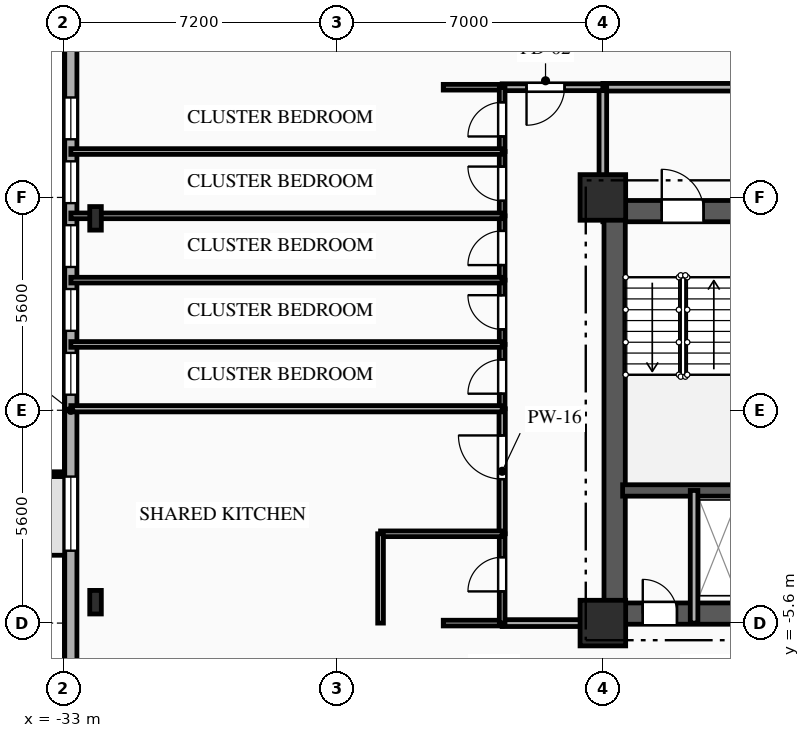
"""IFC4 building model, lengths in metres.
Left out: names, types, materials, properties, quantities, classifications, styles, units other than length and angle.
Written with IfcOpenShell. Run it as: python <this file> out.ifc"""

import sys

from ifc_helpers import new_model, si_unit, direction, frame, frame_2d, origin, origin_2d, place, context, subcontext, project, spatial, rectangle, i_section, extrude, element, fill, save


model = new_model("IFC4")
c1 = context("Model", 3, precision=1e-05, world=origin(), true_north=direction((0.0, 1.0)))
c2 = subcontext(c1, "Body", "Model", "MODEL_VIEW")
j1 = project(units=[si_unit("LENGTHUNIT", "METRE"), si_unit("PLANEANGLEUNIT", "RADIAN")], contexts=[c1])
p1 = place(None, origin())
s1 = spatial("IfcSite", under=j1, at=p1, CompositionType="ELEMENT")
p2 = place(p1, origin())
s2 = spatial("IfcBuilding", under=s1, at=p2, CompositionType="ELEMENT")
p3 = place(p2, frame((0.0, 0.0, 40.4)))
s3 = spatial("IfcBuildingStorey", under=s2, at=p3, CompositionType="ELEMENT", Elevation=40.4)
for number, where, z_axis, x_axis in (
    (1, (-18.8, -5.6, 0.0), (0.0, 0.0, 1.0), (1.0, 0.0, 0.0)),
    (2, (-18.8, 5.6, 0.0), (0.0, 0.0, 1.0), (1.0, 0.0, 0.0)),
):
    element("IfcColumn", number, at=place(p3, frame(where, z_axis=z_axis, x_axis=x_axis)), inside=s3, PredefinedType="COLUMN", context=c2, shape_type="SweptSolid", body=[
        extrude(rectangle(XDim=1.2, YDim=1.2, at=origin_2d()), origin(), (0.0, 0.0, 1.0), 3.35),
    ])
for number, where, z_axis, x_axis in (
    (3, (-32.15, 5.05, 0.0), (0.0, 0.0, 1.0), (1.0, 0.0, 0.0)),
    (4, (-32.15, -5.05, 0.0), (0.0, 0.0, 1.0), (1.0, 0.0, 0.0)),
):
    element("IfcColumn", number, at=place(p3, frame(where, z_axis=z_axis, x_axis=x_axis)), inside=s3, PredefinedType="COLUMN", context=c2, shape_type="SweptSolid", body=[
        extrude(i_section(OverallWidth=0.305, OverallDepth=0.62, WebThickness=0.021, FlangeThickness=0.04, FilletRadius=0.027, at=origin_2d()), origin(), (0.0, 0.0, 1.0), 3.35),
    ])
p4 = place(p3, frame((-32.8, -15.8, 0.0), z_axis=(0.0, 0.0, 1.0), x_axis=(0.0, 1.0, 0.0)))
e5 = element("IfcWall", 5, at=p4, inside=s3, PredefinedType="SOLIDWALL", context=c2, shape_type="SweptSolid", body=[
    extrude(rectangle(XDim=31.6, YDim=0.32, at=frame_2d((15.8, 0.0))), origin(), (0.0, 0.0, 1.0), 3.035),
])
p5 = place(p4, frame((12.105, 0.0, 0.85)))
e6 = element("IfcOpeningElement", 6, at=p5, cuts=e5, PredefinedType="OPENING", context=c2, shape_type="SweptSolid", body=[
    extrude(rectangle(XDim=1.95, YDim=1.85, at=frame_2d((0.975, 0.925))), frame((0.0, 0.17, 0.0), z_axis=(0.0, -1.0, 0.0), x_axis=(1.0, 0.0, 0.0)), (0.0, 0.0, 1.0), 0.34),
])
p6 = place(p4, frame((16.21, 0.0, 0.85)))
e7 = element("IfcOpeningElement", 7, at=p6, cuts=e5, PredefinedType="OPENING", context=c2, shape_type="SweptSolid", body=[
    extrude(rectangle(XDim=1.1, YDim=1.85, at=frame_2d((0.55, 0.925))), frame((0.0, 0.17, 0.0), z_axis=(0.0, -1.0, 0.0), x_axis=(1.0, 0.0, 0.0)), (0.0, 0.0, 1.0), 0.34),
])
p7 = place(p4, frame((17.89, 0.0, 0.85)))
e8 = element("IfcOpeningElement", 8, at=p7, cuts=e5, PredefinedType="OPENING", context=c2, shape_type="SweptSolid", body=[
    extrude(rectangle(XDim=1.1, YDim=1.85, at=frame_2d((0.55, 0.925))), frame((0.0, 0.17, 0.0), z_axis=(0.0, -1.0, 0.0), x_axis=(1.0, 0.0, 0.0)), (0.0, 0.0, 1.0), 0.34),
])
p8 = place(p4, frame((19.57, 0.0, 0.85)))
e9 = element("IfcOpeningElement", 9, at=p8, cuts=e5, PredefinedType="OPENING", context=c2, shape_type="SweptSolid", body=[
    extrude(rectangle(XDim=1.1, YDim=1.85, at=frame_2d((0.55, 0.925))), frame((0.0, 0.17, 0.0), z_axis=(0.0, -1.0, 0.0), x_axis=(1.0, 0.0, 0.0)), (0.0, 0.0, 1.0), 0.34),
])
p9 = place(p4, frame((21.25, 0.0, 0.85)))
e10 = element("IfcOpeningElement", 10, at=p9, cuts=e5, PredefinedType="OPENING", context=c2, shape_type="SweptSolid", body=[
    extrude(rectangle(XDim=1.1, YDim=1.85, at=frame_2d((0.55, 0.925))), frame((0.0, 0.17, 0.0), z_axis=(0.0, -1.0, 0.0), x_axis=(1.0, 0.0, 0.0)), (0.0, 0.0, 1.0), 0.34),
])
p10 = place(p4, frame((22.93, 0.0, 0.85)))
e11 = element("IfcOpeningElement", 11, at=p10, cuts=e5, PredefinedType="OPENING", context=c2, shape_type="SweptSolid", body=[
    extrude(rectangle(XDim=1.1, YDim=1.85, at=frame_2d((0.55, 0.925))), frame((0.0, 0.17, 0.0), z_axis=(0.0, -1.0, 0.0), x_axis=(1.0, 0.0, 0.0)), (0.0, 0.0, 1.0), 0.34),
])
p11 = place(p3, frame((-18.8, 5.24, 0.0), z_axis=(0.0, 0.0, 1.0), x_axis=(1.0, 0.0, 0.0)))
e12 = element("IfcWall", 12, at=p11, inside=s3, PredefinedType="SHEAR", context=c2, shape_type="SweptSolid", body=[
    extrude(rectangle(XDim=9.6, YDim=0.56, at=frame_2d((4.8, 0.0))), origin(), (0.0, 0.0, 1.0), 3.035),
])
p12 = place(p11, frame((1.55, 0.0, 0.0)))
e13 = element("IfcOpeningElement", 13, at=p12, cuts=e12, PredefinedType="OPENING", context=c2, shape_type="SweptSolid", body=[
    extrude(rectangle(XDim=1.1, YDim=2.15, at=frame_2d((0.55, 1.075))), frame((0.0, 0.29, 0.0), z_axis=(0.0, -1.0, 0.0), x_axis=(1.0, 0.0, 0.0)), (0.0, 0.0, 1.0), 0.58),
])
p13 = place(p11, frame((4.775, 0.0, 0.0)))
e14 = element("IfcOpeningElement", 14, at=p13, cuts=e12, PredefinedType="OPENING", context=c2, shape_type="SweptSolid", body=[
    extrude(rectangle(XDim=1.05, YDim=2.1, at=frame_2d((0.525, 1.05))), frame((0.0, 0.29, 0.0), z_axis=(0.0, -1.0, 0.0), x_axis=(1.0, 0.0, 0.0)), (0.0, 0.0, 1.0), 0.58),
])
p14 = place(p3, frame((-18.8, -5.35, 0.0), z_axis=(0.0, 0.0, 1.0), x_axis=(1.0, 0.0, 0.0)))
e15 = element("IfcWall", 15, at=p14, inside=s3, PredefinedType="SHEAR", context=c2, shape_type="SweptSolid", body=[
    extrude(rectangle(XDim=9.6, YDim=0.56, at=frame_2d((4.8, 0.0))), origin(), (0.0, 0.0, 1.0), 3.035),
])
p15 = place(p14, frame((1.05, 0.0, 0.0)))
e16 = element("IfcOpeningElement", 16, at=p15, cuts=e15, PredefinedType="OPENING", context=c2, shape_type="SweptSolid", body=[
    extrude(rectangle(XDim=0.9, YDim=2.1, at=frame_2d((0.45, 1.05))), frame((0.0, 0.29, 0.0), z_axis=(0.0, -1.0, 0.0), x_axis=(1.0, 0.0, 0.0)), (0.0, 0.0, 1.0), 0.58),
])
p16 = place(p3, frame((-18.49, -5.05, 0.0), z_axis=(0.0, 0.0, 1.0), x_axis=(0.0, 1.0, 0.0)))
e17 = element("IfcWall", 17, at=p16, inside=s3, PredefinedType="SHEAR", context=c2, shape_type="SweptSolid", body=[
    extrude(rectangle(XDim=10.1, YDim=0.56, at=frame_2d((5.05, 0.0))), origin(), (0.0, 0.0, 1.0), 3.035),
])
p17 = place(p3, frame((-18.28, -2.11, 0.0), z_axis=(0.0, 0.0, 1.0), x_axis=(1.0, 0.0, 0.0)))
e18 = element("IfcWall", 18, at=p17, inside=s3, PredefinedType="SHEAR", context=c2, shape_type="SweptSolid", body=[
    extrude(rectangle(XDim=3.18, YDim=0.3, at=frame_2d((1.59, 0.0))), origin(), (0.0, 0.0, 1.0), 3.035),
])
p18 = place(p3, frame((-16.4, -5.6, 0.0), z_axis=(0.0, 0.0, 1.0), x_axis=(0.0, 1.0, 0.0)))
e19 = element("IfcWall", 19, at=p18, inside=s3, PredefinedType="PARTITIONING", context=c2, shape_type="SweptSolid", body=[
    extrude(rectangle(XDim=3.49, YDim=0.2, at=frame_2d((1.745, 0.0))), origin(), (0.0, 0.0, 1.0), 3.035),
])
p19 = place(p3, frame((-12.0, 8.5, 0.0), z_axis=(0.0, 0.0, 1.0), x_axis=(-1.0, 0.0, 0.0)))
e20 = element("IfcWall", 20, at=p19, inside=s3, PredefinedType="PARTITIONING", context=c2, shape_type="SweptSolid", body=[
    extrude(rectangle(XDim=6.8, YDim=0.2, at=frame_2d((3.4, 0.0))), origin(), (0.0, 0.0, 1.0), 3.035),
])
p20 = place(p19, frame((1.715, 0.0, 0.0)))
e21 = element("IfcOpeningElement", 21, at=p20, cuts=e20, PredefinedType="OPENING", context=c2, shape_type="SweptSolid", body=[
    extrude(rectangle(XDim=1.1, YDim=2.15, at=frame_2d((0.55, 1.075))), frame((0.0, 0.11, 0.0), z_axis=(0.0, -1.0, 0.0), x_axis=(1.0, 0.0, 0.0)), (0.0, 0.0, 1.0), 0.22),
])
p21 = place(p3, frame((-18.8, 8.5, 0.0), z_axis=(0.0, 0.0, 1.0), x_axis=(0.0, -1.0, 0.0)))
e22 = element("IfcWall", 22, at=p21, inside=s3, PredefinedType="PARTITIONING", context=c2, shape_type="SweptSolid", body=[
    extrude(rectangle(XDim=2.9, YDim=0.2, at=frame_2d((1.45, 0.0))), origin(), (0.0, 0.0, 1.0), 2.52),
])
p22 = place(p3, frame((-18.8, 8.5, 0.0), z_axis=(0.0, 0.0, 1.0), x_axis=(-1.0, 0.0, 0.0)))
e23 = element("IfcWall", 23, at=p22, inside=s3, PredefinedType="PARTITIONING", context=c2, shape_type="SweptSolid", body=[
    extrude(rectangle(XDim=2.65, YDim=0.18, at=frame_2d((1.325, 0.0))), origin(), (0.0, 0.0, 1.0), 3.035),
])
p23 = place(p22, frame((1.009, 0.0, 0.0)))
e24 = element("IfcOpeningElement", 24, at=p23, cuts=e23, PredefinedType="OPENING", context=c2, shape_type="SweptSolid", body=[
    extrude(rectangle(XDim=1.0, YDim=2.15, at=frame_2d((0.5, 1.075))), frame((0.0, 0.1, 0.0), z_axis=(0.0, -1.0, 0.0), x_axis=(1.0, 0.0, 0.0)), (0.0, 0.0, 1.0), 0.2),
])
p24 = place(p3, frame((-21.45, 8.5, 0.0), z_axis=(0.0, 0.0, 1.0), x_axis=(-1.0, 0.0, 0.0)))
e25 = element("IfcWall", 25, at=p24, inside=s3, PredefinedType="PARTITIONING", context=c2, shape_type="SweptSolid", body=[
    extrude(rectangle(XDim=1.55, YDim=0.15, at=frame_2d((0.775, 0.0))), origin(), (0.0, 0.0, 1.0), 3.035),
])
p25 = place(p3, frame((-21.45, -5.6, 0.0), z_axis=(0.0, 0.0, 1.0), x_axis=(1.0, 0.0, 0.0)))
e26 = element("IfcWall", 26, at=p25, inside=s3, PredefinedType="PARTITIONING", context=c2, shape_type="SweptSolid", body=[
    extrude(rectangle(XDim=2.65, YDim=0.18, at=frame_2d((1.325, 0.0))), origin(), (0.0, 0.0, 1.0), 3.035),
])
p26 = place(p3, frame((-23.0, -5.6, 0.0), z_axis=(0.0, 0.0, 1.0), x_axis=(1.0, 0.0, 0.0)))
e27 = element("IfcWall", 27, at=p26, inside=s3, PredefinedType="PLUMBINGWALL", context=c2, shape_type="SweptSolid", body=[
    extrude(rectangle(XDim=1.55, YDim=0.15, at=frame_2d((0.775, 0.0))), origin(), (0.0, 0.0, 1.0), 3.035),
])
p27 = place(p3, frame((-21.45, -5.6, 0.0), z_axis=(0.0, 0.0, 1.0), x_axis=(0.0, 1.0, 0.0)))
e28 = element("IfcWall", 28, at=p27, inside=s3, PredefinedType="PLUMBINGWALL", context=c2, shape_type="SweptSolid", body=[
    extrude(rectangle(XDim=2.35, YDim=0.15, at=frame_2d((1.175, 0.0))), origin(), (0.0, 0.0, 1.0), 3.035),
])
p28 = place(p27, frame((0.834, 0.0, 0.0)))
e29 = element("IfcOpeningElement", 29, at=p28, cuts=e28, PredefinedType="OPENING", context=c2, shape_type="SweptSolid", body=[
    extrude(rectangle(XDim=0.9, YDim=2.1, at=frame_2d((0.45, 1.05))), frame((0.0, 0.085, 0.0), z_axis=(0.0, -1.0, 0.0), x_axis=(1.0, 0.0, 0.0)), (0.0, 0.0, 1.0), 0.17),
])
p29 = place(p3, frame((-21.45, -3.25, 0.0), z_axis=(0.0, 0.0, 1.0), x_axis=(0.0, 1.0, 0.0)))
e30 = element("IfcWall", 30, at=p29, inside=s3, PredefinedType="PARTITIONING", context=c2, shape_type="SweptSolid", body=[
    extrude(rectangle(XDim=3.29, YDim=0.165, at=frame_2d((1.645, 0.0))), origin(), (0.0, 0.0, 1.0), 3.035),
])
p30 = place(p29, frame((1.438, 0.0, 0.0)))
e31 = element("IfcOpeningElement", 31, at=p30, cuts=e30, PredefinedType="OPENING", context=c2, shape_type="SweptSolid", body=[
    extrude(rectangle(XDim=1.15, YDim=2.15, at=frame_2d((0.575, 1.075))), frame((0.0, 0.093, 0.0), z_axis=(0.0, -1.0, 0.0), x_axis=(1.0, 0.0, 0.0)), (0.0, 0.0, 1.0), 0.185),
])
p31 = place(p3, frame((-21.45, 0.04, 0.0), z_axis=(0.0, 0.0, 1.0), x_axis=(0.0, 1.0, 0.0)))
e32 = element("IfcWall", 32, at=p31, inside=s3, PredefinedType="PARTITIONING", context=c2, shape_type="SweptSolid", body=[
    extrude(rectangle(XDim=1.692, YDim=0.15, at=frame_2d((0.846, 0.0))), origin(), (0.0, 0.0, 1.0), 3.035),
])
p32 = place(p31, frame((0.396, 0.0, 0.0)))
e33 = element("IfcOpeningElement", 33, at=p32, cuts=e32, PredefinedType="OPENING", context=c2, shape_type="SweptSolid", body=[
    extrude(rectangle(XDim=0.9, YDim=2.1, at=frame_2d((0.45, 1.05))), frame((0.0, 0.085, 0.0), z_axis=(0.0, -1.0, 0.0), x_axis=(1.0, 0.0, 0.0)), (0.0, 0.0, 1.0), 0.17),
])
p33 = place(p3, frame((-21.45, 1.732, 0.0), z_axis=(0.0, 0.0, 1.0), x_axis=(0.0, 1.0, 0.0)))
e34 = element("IfcWall", 34, at=p33, inside=s3, PredefinedType="PARTITIONING", context=c2, shape_type="SweptSolid", body=[
    extrude(rectangle(XDim=1.692, YDim=0.15, at=frame_2d((0.846, 0.0))), origin(), (0.0, 0.0, 1.0), 3.035),
])
p34 = place(p33, frame((0.396, 0.0, 0.0)))
e35 = element("IfcOpeningElement", 35, at=p34, cuts=e34, PredefinedType="OPENING", context=c2, shape_type="SweptSolid", body=[
    extrude(rectangle(XDim=0.9, YDim=2.1, at=frame_2d((0.45, 1.05))), frame((0.0, 0.085, 0.0), z_axis=(0.0, -1.0, 0.0), x_axis=(1.0, 0.0, 0.0)), (0.0, 0.0, 1.0), 0.17),
])
p35 = place(p3, frame((-21.45, 3.424, 0.0), z_axis=(0.0, 0.0, 1.0), x_axis=(0.0, 1.0, 0.0)))
e36 = element("IfcWall", 36, at=p35, inside=s3, PredefinedType="PARTITIONING", context=c2, shape_type="SweptSolid", body=[
    extrude(rectangle(XDim=1.692, YDim=0.15, at=frame_2d((0.846, 0.0))), origin(), (0.0, 0.0, 1.0), 3.035),
])
p36 = place(p35, frame((0.396, 0.0, 0.0)))
e37 = element("IfcOpeningElement", 37, at=p36, cuts=e36, PredefinedType="OPENING", context=c2, shape_type="SweptSolid", body=[
    extrude(rectangle(XDim=0.9, YDim=2.1, at=frame_2d((0.45, 1.05))), frame((0.0, 0.085, 0.0), z_axis=(0.0, -1.0, 0.0), x_axis=(1.0, 0.0, 0.0)), (0.0, 0.0, 1.0), 0.17),
])
p37 = place(p3, frame((-21.45, 5.116, 0.0), z_axis=(0.0, 0.0, 1.0), x_axis=(0.0, 1.0, 0.0)))
e38 = element("IfcWall", 38, at=p37, inside=s3, PredefinedType="PARTITIONING", context=c2, shape_type="SweptSolid", body=[
    extrude(rectangle(XDim=1.692, YDim=0.15, at=frame_2d((0.846, 0.0))), origin(), (0.0, 0.0, 1.0), 3.035),
])
p38 = place(p37, frame((0.396, 0.0, 0.0)))
e39 = element("IfcOpeningElement", 39, at=p38, cuts=e38, PredefinedType="OPENING", context=c2, shape_type="SweptSolid", body=[
    extrude(rectangle(XDim=0.9, YDim=2.1, at=frame_2d((0.45, 1.05))), frame((0.0, 0.085, 0.0), z_axis=(0.0, -1.0, 0.0), x_axis=(1.0, 0.0, 0.0)), (0.0, 0.0, 1.0), 0.17),
])
p39 = place(p3, frame((-21.45, 6.808, 0.0), z_axis=(0.0, 0.0, 1.0), x_axis=(0.0, 1.0, 0.0)))
e40 = element("IfcWall", 40, at=p39, inside=s3, PredefinedType="PARTITIONING", context=c2, shape_type="SweptSolid", body=[
    extrude(rectangle(XDim=1.692, YDim=0.15, at=frame_2d((0.846, 0.0))), origin(), (0.0, 0.0, 1.0), 3.035),
])
p40 = place(p39, frame((0.396, 0.0, 0.0)))
e41 = element("IfcOpeningElement", 41, at=p40, cuts=e40, PredefinedType="OPENING", context=c2, shape_type="SweptSolid", body=[
    extrude(rectangle(XDim=0.9, YDim=2.1, at=frame_2d((0.45, 1.05))), frame((0.0, 0.085, 0.0), z_axis=(0.0, -1.0, 0.0), x_axis=(1.0, 0.0, 0.0)), (0.0, 0.0, 1.0), 0.17),
])
p41 = place(p3, frame((-24.65, -3.25, 0.0), z_axis=(0.0, 0.0, 1.0), x_axis=(1.0, 0.0, 0.0)))
e42 = element("IfcWall", 42, at=p41, inside=s3, PredefinedType="PLUMBINGWALL", context=c2, shape_type="SweptSolid", body=[
    extrude(rectangle(XDim=3.2, YDim=0.15, at=frame_2d((1.6, 0.0))), origin(), (0.0, 0.0, 1.0), 2.52),
])
p42 = place(p3, frame((-24.65, -5.6, 0.0), z_axis=(0.0, 0.0, 1.0), x_axis=(0.0, 1.0, 0.0)))
e43 = element("IfcWall", 43, at=p42, inside=s3, PredefinedType="PLUMBINGWALL", context=c2, shape_type="SweptSolid", body=[
    extrude(rectangle(XDim=2.35, YDim=0.15, at=frame_2d((1.175, 0.0))), origin(), (0.0, 0.0, 1.0), 3.035),
])
p43 = place(p3, frame((-32.8, 0.04, 0.0), z_axis=(0.0, 0.0, 1.0), x_axis=(1.0, 0.0, 0.0)))
e44 = element("IfcWall", 44, at=p43, inside=s3, PredefinedType="PARTITIONING", context=c2, shape_type="SweptSolid", body=[
    extrude(rectangle(XDim=11.35, YDim=0.165, at=frame_2d((5.675, 0.0))), origin(), (0.0, 0.0, 1.0), 3.035),
])
p44 = place(p3, frame((-32.8, 1.732, 0.0), z_axis=(0.0, 0.0, 1.0), x_axis=(1.0, 0.0, 0.0)))
e45 = element("IfcWall", 45, at=p44, inside=s3, PredefinedType="PARTITIONING", context=c2, shape_type="SweptSolid", body=[
    extrude(rectangle(XDim=11.35, YDim=0.15, at=frame_2d((5.675, 0.0))), origin(), (0.0, 0.0, 1.0), 3.035),
])
for number, where, z_axis, x_axis in (
    (46, (-32.8, 3.424, 0.0), (0.0, 0.0, 1.0), (1.0, 0.0, 0.0)),
    (47, (-32.8, 5.116, 0.0), (0.0, 0.0, 1.0), (1.0, 0.0, 0.0)),
):
    element("IfcWall", number, at=place(p3, frame(where, z_axis=z_axis, x_axis=x_axis)), inside=s3, PredefinedType="PARTITIONING", context=c2, shape_type="SweptSolid", body=[
        extrude(rectangle(XDim=11.35, YDim=0.15, at=frame_2d((5.675, 0.0))), origin(), (0.0, 0.0, 1.0), 2.52),
    ])
p45 = place(p3, frame((-32.8, 6.808, 0.0), z_axis=(0.0, 0.0, 1.0), x_axis=(1.0, 0.0, 0.0)))
e48 = element("IfcWall", 48, at=p45, inside=s3, PredefinedType="PARTITIONING", context=c2, shape_type="SweptSolid", body=[
    extrude(rectangle(XDim=11.35, YDim=0.15, at=frame_2d((5.675, 0.0))), origin(), (0.0, 0.0, 1.0), 3.035),
])
p46 = place(p5, origin())
e49 = element("IfcWindow", 49, at=p46, inside=s3, PartitioningType="SINGLE_PANEL", PredefinedType="WINDOW", context=c2, shape_type="SweptSolid", body=[
    extrude(rectangle(XDim=1.95, YDim=1.85, at=frame_2d((0.975, 0.925))), frame((0.0, 0.03, 0.0), z_axis=(0.0, -1.0, 0.0), x_axis=(1.0, 0.0, 0.0)), (0.0, 0.0, 1.0), 0.06),
])
fill(e6, e49)
p47 = place(p6, origin())
e50 = element("IfcWindow", 50, at=p47, inside=s3, PartitioningType="SINGLE_PANEL", PredefinedType="WINDOW", context=c2, shape_type="SweptSolid", body=[
    extrude(rectangle(XDim=1.1, YDim=1.85, at=frame_2d((0.55, 0.925))), frame((0.0, 0.03, 0.0), z_axis=(0.0, -1.0, 0.0), x_axis=(1.0, 0.0, 0.0)), (0.0, 0.0, 1.0), 0.06),
])
fill(e7, e50)
p48 = place(p7, origin())
e51 = element("IfcWindow", 51, at=p48, inside=s3, PartitioningType="SINGLE_PANEL", PredefinedType="WINDOW", context=c2, shape_type="SweptSolid", body=[
    extrude(rectangle(XDim=1.1, YDim=1.85, at=frame_2d((0.55, 0.925))), frame((0.0, 0.03, 0.0), z_axis=(0.0, -1.0, 0.0), x_axis=(1.0, 0.0, 0.0)), (0.0, 0.0, 1.0), 0.06),
])
fill(e8, e51)
p49 = place(p8, origin())
e52 = element("IfcWindow", 52, at=p49, inside=s3, PartitioningType="SINGLE_PANEL", PredefinedType="WINDOW", context=c2, shape_type="SweptSolid", body=[
    extrude(rectangle(XDim=1.1, YDim=1.85, at=frame_2d((0.55, 0.925))), frame((0.0, 0.03, 0.0), z_axis=(0.0, -1.0, 0.0), x_axis=(1.0, 0.0, 0.0)), (0.0, 0.0, 1.0), 0.06),
])
fill(e9, e52)
p50 = place(p9, origin())
e53 = element("IfcWindow", 53, at=p50, inside=s3, PartitioningType="SINGLE_PANEL", PredefinedType="WINDOW", context=c2, shape_type="SweptSolid", body=[
    extrude(rectangle(XDim=1.1, YDim=1.85, at=frame_2d((0.55, 0.925))), frame((0.0, 0.03, 0.0), z_axis=(0.0, -1.0, 0.0), x_axis=(1.0, 0.0, 0.0)), (0.0, 0.0, 1.0), 0.06),
])
fill(e10, e53)
p51 = place(p10, origin())
e54 = element("IfcWindow", 54, at=p51, inside=s3, PartitioningType="SINGLE_PANEL", PredefinedType="WINDOW", context=c2, shape_type="SweptSolid", body=[
    extrude(rectangle(XDim=1.1, YDim=1.85, at=frame_2d((0.55, 0.925))), frame((0.0, 0.03, 0.0), z_axis=(0.0, -1.0, 0.0), x_axis=(1.0, 0.0, 0.0)), (0.0, 0.0, 1.0), 0.06),
])
fill(e11, e54)
p52 = place(p12, origin())
e55 = element("IfcDoor", 55, at=p52, inside=s3, OperationType="SINGLE_SWING_LEFT", PredefinedType="DOOR", context=c2, shape_type="SweptSolid", body=[
    extrude(rectangle(XDim=1.1, YDim=2.15, at=frame_2d((0.55, 1.075))), frame((0.0, 0.025, 0.0), z_axis=(0.0, -1.0, 0.0), x_axis=(1.0, 0.0, 0.0)), (0.0, 0.0, 1.0), 0.05),
])
fill(e13, e55)
p53 = place(p15, origin())
e56 = element("IfcDoor", 56, at=p53, inside=s3, OperationType="SINGLE_SWING_LEFT", PredefinedType="DOOR", context=c2, shape_type="SweptSolid", body=[
    extrude(rectangle(XDim=0.9, YDim=2.1, at=frame_2d((0.45, 1.05))), frame((0.0, 0.025, 0.0), z_axis=(0.0, -1.0, 0.0), x_axis=(1.0, 0.0, 0.0)), (0.0, 0.0, 1.0), 0.05),
])
fill(e16, e56)
p54 = place(p23, origin())
e57 = element("IfcDoor", 57, at=p54, inside=s3, OperationType="SINGLE_SWING_RIGHT", PredefinedType="DOOR", context=c2, shape_type="SweptSolid", body=[
    extrude(rectangle(XDim=1.0, YDim=2.15, at=frame_2d((0.5, 1.075))), frame((0.0, 0.025, 0.0), z_axis=(0.0, -1.0, 0.0), x_axis=(1.0, 0.0, 0.0)), (0.0, 0.0, 1.0), 0.05),
])
fill(e24, e57)
p55 = place(p28, origin())
e58 = element("IfcDoor", 58, at=p55, inside=s3, OperationType="SINGLE_SWING_LEFT", PredefinedType="DOOR", context=c2, shape_type="SweptSolid", body=[
    extrude(rectangle(XDim=0.9, YDim=2.1, at=frame_2d((0.45, 1.05))), frame((0.0, 0.025, 0.0), z_axis=(0.0, -1.0, 0.0), x_axis=(1.0, 0.0, 0.0)), (0.0, 0.0, 1.0), 0.05),
])
fill(e29, e58)
p56 = place(p30, origin())
e59 = element("IfcDoor", 59, at=p56, inside=s3, OperationType="SINGLE_SWING_RIGHT", PredefinedType="DOOR", context=c2, shape_type="SweptSolid", body=[
    extrude(rectangle(XDim=1.15, YDim=2.15, at=frame_2d((0.575, 1.075))), frame((0.0, 0.025, 0.0), z_axis=(0.0, -1.0, 0.0), x_axis=(1.0, 0.0, 0.0)), (0.0, 0.0, 1.0), 0.05),
])
fill(e31, e59)
p57 = place(p32, origin())
e60 = element("IfcDoor", 60, at=p57, inside=s3, OperationType="SINGLE_SWING_LEFT", PredefinedType="DOOR", context=c2, shape_type="SweptSolid", body=[
    extrude(rectangle(XDim=0.9, YDim=2.1, at=frame_2d((0.45, 1.05))), frame((0.0, 0.025, 0.0), z_axis=(0.0, -1.0, 0.0), x_axis=(1.0, 0.0, 0.0)), (0.0, 0.0, 1.0), 0.05),
])
fill(e33, e60)
p58 = place(p34, origin())
e61 = element("IfcDoor", 61, at=p58, inside=s3, OperationType="SINGLE_SWING_RIGHT", PredefinedType="DOOR", context=c2, shape_type="SweptSolid", body=[
    extrude(rectangle(XDim=0.9, YDim=2.1, at=frame_2d((0.45, 1.05))), frame((0.0, 0.025, 0.0), z_axis=(0.0, -1.0, 0.0), x_axis=(1.0, 0.0, 0.0)), (0.0, 0.0, 1.0), 0.05),
])
fill(e35, e61)
p59 = place(p36, origin())
e62 = element("IfcDoor", 62, at=p59, inside=s3, OperationType="SINGLE_SWING_LEFT", PredefinedType="DOOR", context=c2, shape_type="SweptSolid", body=[
    extrude(rectangle(XDim=0.9, YDim=2.1, at=frame_2d((0.45, 1.05))), frame((0.0, 0.025, 0.0), z_axis=(0.0, -1.0, 0.0), x_axis=(1.0, 0.0, 0.0)), (0.0, 0.0, 1.0), 0.05),
])
fill(e37, e62)
p60 = place(p38, origin())
e63 = element("IfcDoor", 63, at=p60, inside=s3, OperationType="SINGLE_SWING_RIGHT", PredefinedType="DOOR", context=c2, shape_type="SweptSolid", body=[
    extrude(rectangle(XDim=0.9, YDim=2.1, at=frame_2d((0.45, 1.05))), frame((0.0, 0.025, 0.0), z_axis=(0.0, -1.0, 0.0), x_axis=(1.0, 0.0, 0.0)), (0.0, 0.0, 1.0), 0.05),
])
fill(e39, e63)
p61 = place(p40, origin())
e64 = element("IfcDoor", 64, at=p61, inside=s3, OperationType="SINGLE_SWING_LEFT", PredefinedType="DOOR", context=c2, shape_type="SweptSolid", body=[
    extrude(rectangle(XDim=0.9, YDim=2.1, at=frame_2d((0.45, 1.05))), frame((0.0, 0.025, 0.0), z_axis=(0.0, -1.0, 0.0), x_axis=(1.0, 0.0, 0.0)), (0.0, 0.0, 1.0), 0.05),
])
fill(e41, e64)
save(model, sys.argv[1])
